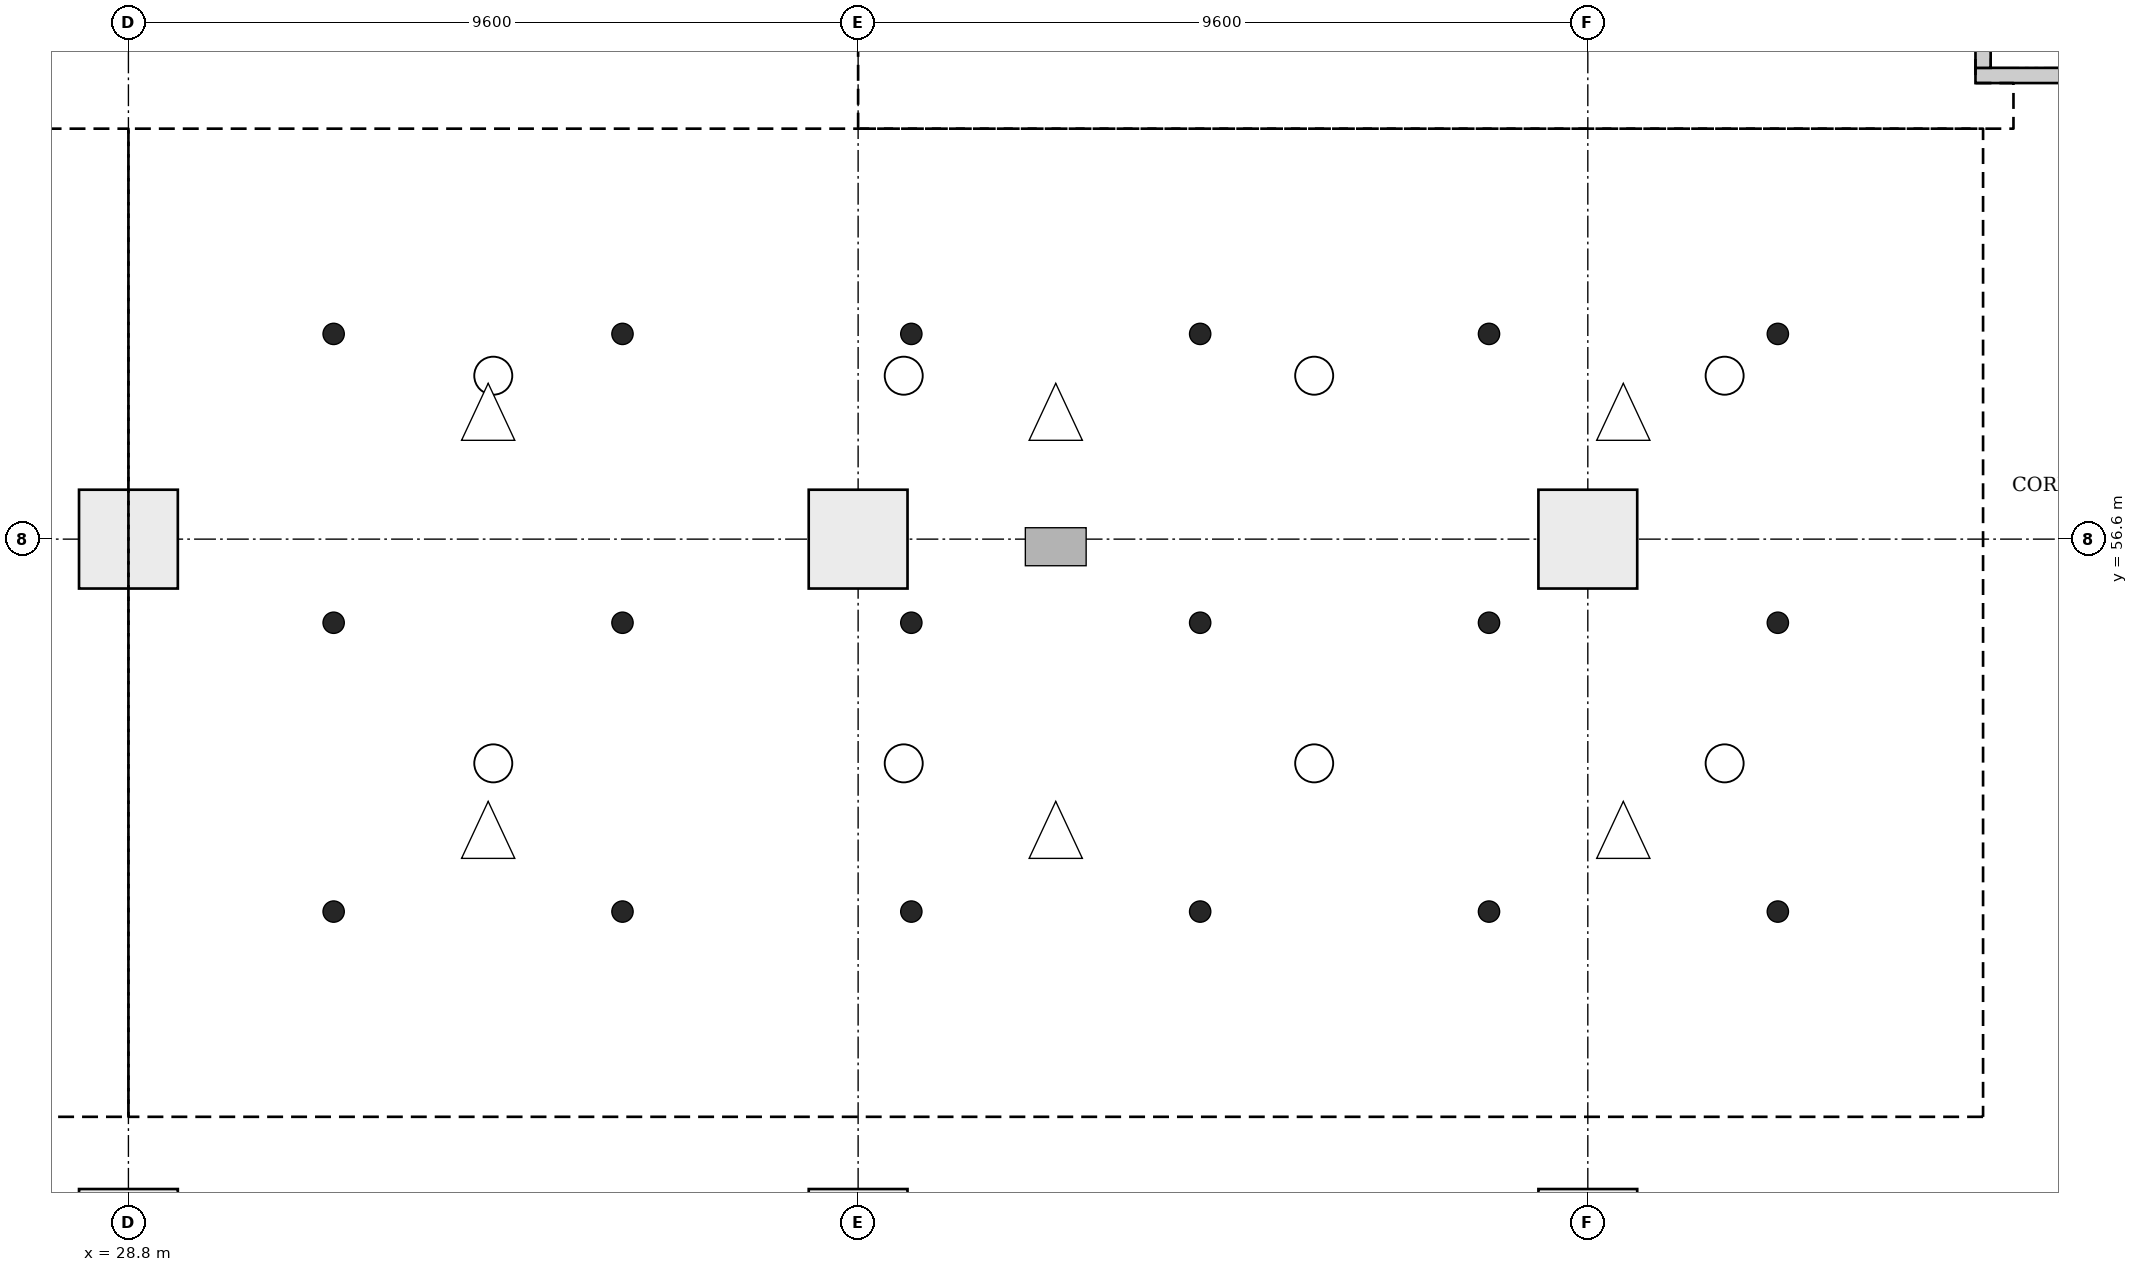
"""IFC4 building model, lengths in metres.
Left out: names, types, materials, properties, quantities, classifications, styles, units other than length and angle.
Written with IfcOpenShell. Run it as: python <this file> out.ifc"""

import sys

from ifc_helpers import new_model, si_unit, direction, frame, frame_2d, origin, origin_2d, place, context, subcontext, project, spatial, rectangle, extrude, element, save


model = new_model("IFC4")
c1 = context("Model", 3, precision=1e-05, world=origin(), true_north=direction((0.0, 1.0)))
c2 = subcontext(c1, "Body", "Model", "MODEL_VIEW")
j1 = project(units=[si_unit("LENGTHUNIT", "METRE"), si_unit("PLANEANGLEUNIT", "RADIAN")], contexts=[c1])
p1 = place(None, origin())
s1 = spatial("IfcSite", under=j1, at=p1, CompositionType="ELEMENT")
p2 = place(p1, origin())
s2 = spatial("IfcBuilding", under=s1, at=p2, CompositionType="ELEMENT")
p3 = place(p2, origin())
s3 = spatial("IfcBuildingStorey", under=s2, at=p3, CompositionType="ELEMENT", Elevation=0.0)
for number, where, z_axis, x_axis in (
    (1, (28.8, 47.4, 0.0), (0.0, 0.0, 1.0), (1.0, 0.0, 0.0)),
    (2, (38.4, 47.4, 0.0), (0.0, 0.0, 1.0), (1.0, 0.0, 0.0)),
    (3, (48.0, 47.4, 0.0), (0.0, 0.0, 1.0), (1.0, 0.0, 0.0)),
    (4, (28.8, 56.6, 0.0), (0.0, 0.0, 1.0), (1.0, 0.0, 0.0)),
    (5, (38.4, 56.6, 0.0), (0.0, 0.0, 1.0), (1.0, 0.0, 0.0)),
    (6, (48.0, 56.6, 0.0), (0.0, 0.0, 1.0), (1.0, 0.0, 0.0)),
):
    element("IfcColumn", number, at=place(p3, frame(where, z_axis=z_axis, x_axis=x_axis)), inside=s3, PredefinedType="COLUMN", context=c2, shape_type="SweptSolid", body=[
        extrude(rectangle(XDim=1.3, YDim=1.3, at=origin_2d()), origin(), (0.0, 0.0, 1.0), 6.5),
    ])
p4 = place(p3, frame((53.1, 62.7, 0.0), z_axis=(0.0, 0.0, 1.0), x_axis=(1.0, 0.0, 0.0)))
e7 = element("IfcWall", 7, at=p4, inside=s3, PredefinedType="PARTITIONING", context=c2, shape_type="SweptSolid", body=[
    extrude(rectangle(XDim=1.294, YDim=0.2, at=frame_2d((0.647, 0.0))), origin(), (0.0, 0.0, 1.0), 6.05),
])
p5 = place(p3, frame((53.2, 62.8, 0.0), z_axis=(0.0, 0.0, 1.0), x_axis=(0.0, 1.0, 0.0)))
e8 = element("IfcWall", 8, at=p5, inside=s3, PredefinedType="PARTITIONING", context=c2, shape_type="SweptSolid", body=[
    extrude(rectangle(XDim=3.894, YDim=0.2, at=frame_2d((1.947, 0.0))), origin(), (0.0, 0.0, 1.0), 6.05),
])
p6 = place(p5, frame((1.347, 0.0, 0.0)))
e9 = element("IfcOpeningElement", 9, at=p6, cuts=e8, PredefinedType="OPENING", context=c2, shape_type="SweptSolid", body=[
    extrude(rectangle(XDim=1.2, YDim=2.1, at=frame_2d((0.6, 1.05))), frame((0.0, 0.11, 0.0), z_axis=(0.0, -1.0, 0.0), x_axis=(1.0, 0.0, 0.0)), (0.0, 0.0, 1.0), 0.22),
])
save(model, sys.argv[1])
